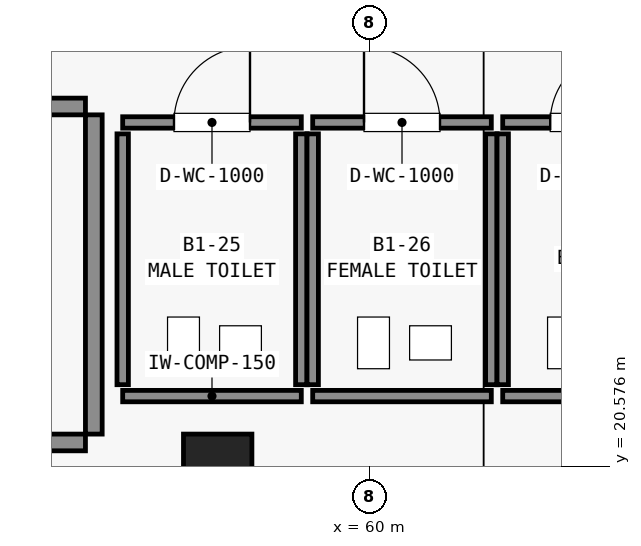
"""IFC4 building model, lengths in metres.
Left out: names, types, materials, properties, quantities, classifications, styles, units other than length and angle.
Written with IfcOpenShell. Run it as: python <this file> out.ifc"""

import sys

from ifc_helpers import new_model, si_unit, direction, frame, frame_2d, origin, origin_2d, place, context, subcontext, project, spatial, rectangle, extrude, element, fill, save


model = new_model("IFC4")
c1 = context("Model", 3, precision=1e-05, world=origin(), true_north=direction((0.0, 1.0)))
c2 = subcontext(c1, "Body", "Model", "MODEL_VIEW")
j1 = project(units=[si_unit("LENGTHUNIT", "METRE"), si_unit("PLANEANGLEUNIT", "RADIAN")], contexts=[c1])
p1 = place(None, origin())
s1 = spatial("IfcSite", under=j1, at=p1, CompositionType="ELEMENT")
p2 = place(p1, origin())
s2 = spatial("IfcBuilding", under=s1, at=p2, CompositionType="ELEMENT")
p3 = place(p2, frame((0.0, 0.0, -5.4)))
s3 = spatial("IfcBuildingStorey", under=s2, at=p3, CompositionType="ELEMENT", Elevation=-5.4)
p4 = place(p3, frame((58.0, 20.4, 0.0), z_axis=(0.0, 0.0, 1.0), x_axis=(1.0, 0.0, 0.0)))
e1 = element("IfcColumn", 1, at=p4, inside=s3, PredefinedType="PILASTER", context=c2, shape_type="SweptSolid", body=[
    extrude(rectangle(XDim=0.9, YDim=1.2, at=origin_2d()), origin(), (0.0, 0.0, 1.0), 5.4),
])
for number, where, z_axis, x_axis in (
    (2, (48.1, 20.89, 0.0), (0.0, 0.0, 1.0), (1.0, 0.0, 0.0)),
    (3, (48.1, 25.31, 0.0), (0.0, 0.0, 1.0), (1.0, 0.0, 0.0)),
):
    element("IfcWall", number, at=place(p3, frame(where, z_axis=z_axis, x_axis=x_axis)), inside=s3, PredefinedType="SHEAR", context=c2, shape_type="SweptSolid", body=[
        extrude(rectangle(XDim=8.16, YDim=0.22, at=frame_2d((4.08, 0.0))), origin(), (0.0, 0.0, 1.0), 5.4),
    ])
p5 = place(p3, frame((56.37, 21.0, 0.0), z_axis=(0.0, 0.0, 1.0), x_axis=(0.0, 1.0, 0.0)))
e4 = element("IfcWall", 4, at=p5, inside=s3, PredefinedType="SHEAR", context=c2, shape_type="SweptSolid", body=[
    extrude(rectangle(XDim=4.2, YDim=0.22, at=frame_2d((2.1, 0.0))), origin(), (0.0, 0.0, 1.0), 5.4),
])
p6 = place(p3, frame((56.75, 21.5, 0.0), z_axis=(0.0, 0.0, 1.0), x_axis=(1.0, 0.0, 0.0)))
e5 = element("IfcWall", 5, at=p6, inside=s3, PredefinedType="STANDARD", context=c2, shape_type="SweptSolid", body=[
    extrude(rectangle(XDim=2.35, YDim=0.15, at=frame_2d((1.175, 0.0))), origin(), (0.0, 0.0, 1.0), 4.96),
])
p7 = place(p3, frame((56.75, 25.1, 0.0), z_axis=(0.0, 0.0, 1.0), x_axis=(1.0, 0.0, 0.0)))
e6 = element("IfcWall", 6, at=p7, inside=s3, PredefinedType="STANDARD", context=c2, shape_type="SweptSolid", body=[
    extrude(rectangle(XDim=2.35, YDim=0.15, at=frame_2d((1.175, 0.0))), origin(), (0.0, 0.0, 1.0), 4.96),
])
p8 = place(p7, frame((0.675, 0.0, 0.0)))
e7 = element("IfcOpeningElement", 7, at=p8, cuts=e6, PredefinedType="OPENING", context=c2, shape_type="SweptSolid", body=[
    extrude(rectangle(XDim=1.0, YDim=2.15, at=frame_2d((0.5, 1.075))), frame((0.0, 0.085, 0.0), z_axis=(0.0, -1.0, 0.0), x_axis=(1.0, 0.0, 0.0)), (0.0, 0.0, 1.0), 0.17),
])
for number, where, z_axis, x_axis in (
    (8, (56.75, 21.65, 0.0), (0.0, 0.0, 1.0), (0.0, 1.0, 0.0)),
    (9, (59.1, 21.65, 0.0), (0.0, 0.0, 1.0), (0.0, 1.0, 0.0)),
):
    element("IfcWall", number, at=place(p3, frame(where, z_axis=z_axis, x_axis=x_axis)), inside=s3, PredefinedType="STANDARD", context=c2, shape_type="SweptSolid", body=[
        extrude(rectangle(XDim=3.3, YDim=0.15, at=frame_2d((1.65, 0.0))), origin(), (0.0, 0.0, 1.0), 4.96),
    ])
p9 = place(p3, frame((59.25, 21.5, 0.0), z_axis=(0.0, 0.0, 1.0), x_axis=(1.0, 0.0, 0.0)))
e10 = element("IfcWall", 10, at=p9, inside=s3, PredefinedType="STANDARD", context=c2, shape_type="SweptSolid", body=[
    extrude(rectangle(XDim=2.35, YDim=0.15, at=frame_2d((1.175, 0.0))), origin(), (0.0, 0.0, 1.0), 4.96),
])
p10 = place(p3, frame((59.25, 25.1, 0.0), z_axis=(0.0, 0.0, 1.0), x_axis=(1.0, 0.0, 0.0)))
e11 = element("IfcWall", 11, at=p10, inside=s3, PredefinedType="STANDARD", context=c2, shape_type="SweptSolid", body=[
    extrude(rectangle(XDim=2.35, YDim=0.15, at=frame_2d((1.175, 0.0))), origin(), (0.0, 0.0, 1.0), 4.96),
])
p11 = place(p10, frame((0.675, 0.0, 0.0)))
e12 = element("IfcOpeningElement", 12, at=p11, cuts=e11, PredefinedType="OPENING", context=c2, shape_type="SweptSolid", body=[
    extrude(rectangle(XDim=1.0, YDim=2.15, at=frame_2d((0.5, 1.075))), frame((0.0, 0.085, 0.0), z_axis=(0.0, -1.0, 0.0), x_axis=(1.0, 0.0, 0.0)), (0.0, 0.0, 1.0), 0.17),
])
for number, where, z_axis, x_axis in (
    (13, (59.25, 21.65, 0.0), (0.0, 0.0, 1.0), (0.0, 1.0, 0.0)),
    (14, (61.6, 21.65, 0.0), (0.0, 0.0, 1.0), (0.0, 1.0, 0.0)),
):
    element("IfcWall", number, at=place(p3, frame(where, z_axis=z_axis, x_axis=x_axis)), inside=s3, PredefinedType="STANDARD", context=c2, shape_type="SweptSolid", body=[
        extrude(rectangle(XDim=3.3, YDim=0.15, at=frame_2d((1.65, 0.0))), origin(), (0.0, 0.0, 1.0), 4.96),
    ])
p12 = place(p3, frame((61.75, 21.5, 0.0), z_axis=(0.0, 0.0, 1.0), x_axis=(1.0, 0.0, 0.0)))
e15 = element("IfcWall", 15, at=p12, inside=s3, PredefinedType="STANDARD", context=c2, shape_type="SweptSolid", body=[
    extrude(rectangle(XDim=2.2, YDim=0.15, at=frame_2d((1.1, 0.0))), origin(), (0.0, 0.0, 1.0), 4.96),
])
p13 = place(p3, frame((61.75, 25.1, 0.0), z_axis=(0.0, 0.0, 1.0), x_axis=(1.0, 0.0, 0.0)))
e16 = element("IfcWall", 16, at=p13, inside=s3, PredefinedType="STANDARD", context=c2, shape_type="SweptSolid", body=[
    extrude(rectangle(XDim=2.2, YDim=0.15, at=frame_2d((1.1, 0.0))), origin(), (0.0, 0.0, 1.0), 4.96),
])
p14 = place(p13, frame((0.625, 0.0, 0.0)))
e17 = element("IfcOpeningElement", 17, at=p14, cuts=e16, PredefinedType="OPENING", context=c2, shape_type="SweptSolid", body=[
    extrude(rectangle(XDim=0.95, YDim=2.15, at=frame_2d((0.475, 1.075))), frame((0.0, 0.085, 0.0), z_axis=(0.0, -1.0, 0.0), x_axis=(1.0, 0.0, 0.0)), (0.0, 0.0, 1.0), 0.17),
])
p15 = place(p3, frame((61.75, 21.65, 0.0), z_axis=(0.0, 0.0, 1.0), x_axis=(0.0, 1.0, 0.0)))
e18 = element("IfcWall", 18, at=p15, inside=s3, PredefinedType="STANDARD", context=c2, shape_type="SweptSolid", body=[
    extrude(rectangle(XDim=3.3, YDim=0.15, at=frame_2d((1.65, 0.0))), origin(), (0.0, 0.0, 1.0), 4.96),
])
p16 = place(p8, origin())
e19 = element("IfcDoor", 19, at=p16, inside=s3, OperationType="SINGLE_SWING_RIGHT", PredefinedType="DOOR", context=c2, shape_type="SweptSolid", body=[
    extrude(rectangle(XDim=1.0, YDim=2.15, at=frame_2d((0.5, 1.075))), frame((0.0, 0.025, 0.0), z_axis=(0.0, -1.0, 0.0), x_axis=(1.0, 0.0, 0.0)), (0.0, 0.0, 1.0), 0.05),
])
fill(e7, e19)
p17 = place(p11, origin())
e20 = element("IfcDoor", 20, at=p17, inside=s3, OperationType="SINGLE_SWING_LEFT", PredefinedType="DOOR", context=c2, shape_type="SweptSolid", body=[
    extrude(rectangle(XDim=1.0, YDim=2.15, at=frame_2d((0.5, 1.075))), frame((0.0, 0.025, 0.0), z_axis=(0.0, -1.0, 0.0), x_axis=(1.0, 0.0, 0.0)), (0.0, 0.0, 1.0), 0.05),
])
fill(e12, e20)
p18 = place(p14, origin())
e21 = element("IfcDoor", 21, at=p18, inside=s3, OperationType="SINGLE_SWING_RIGHT", PredefinedType="DOOR", context=c2, shape_type="SweptSolid", body=[
    extrude(rectangle(XDim=0.95, YDim=2.15, at=frame_2d((0.475, 1.075))), frame((0.0, 0.025, 0.0), z_axis=(0.0, -1.0, 0.0), x_axis=(1.0, 0.0, 0.0)), (0.0, 0.0, 1.0), 0.05),
])
fill(e17, e21)
save(model, sys.argv[1])
